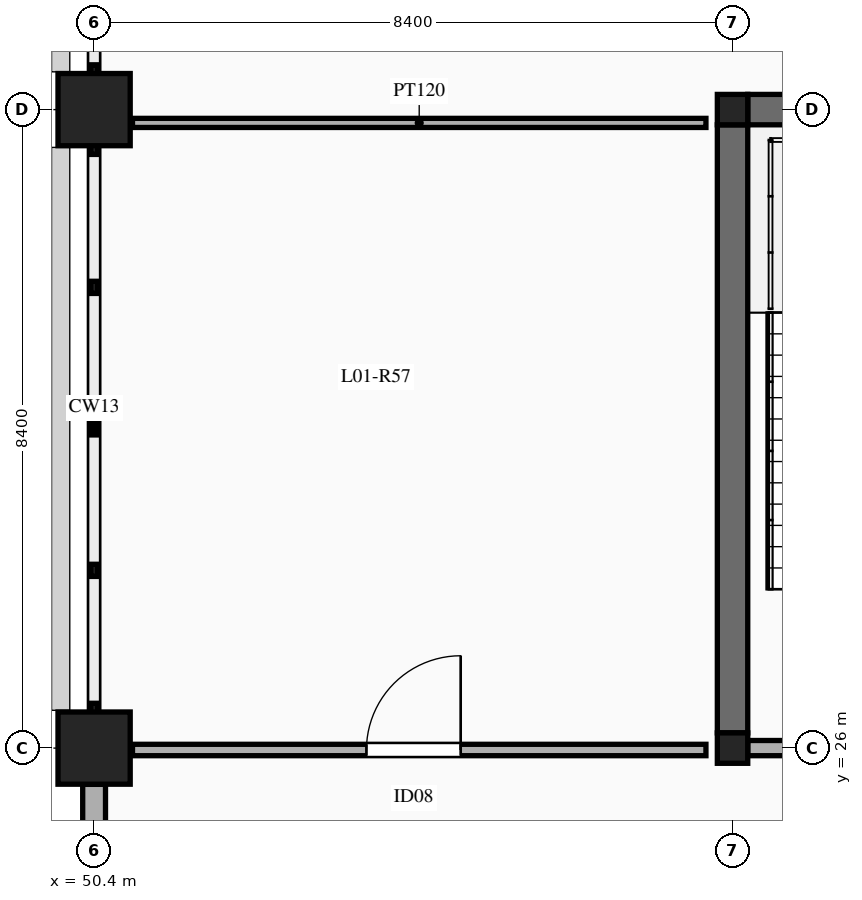
"""IFC4 building model, lengths in metres.
Left out: names, types, materials, properties, quantities, classifications, styles, units other than length and angle.
Written with IfcOpenShell. Run it as: python <this file> out.ifc"""

import sys

from ifc_helpers import new_model, si_unit, direction, frame, frame_2d, origin, origin_2d, place, context, subcontext, project, spatial, rectangle, extrude, element, fill, save


model = new_model("IFC4")
c1 = context("Model", 3, precision=1e-05, world=origin(), true_north=direction((0.0, 1.0)))
c2 = subcontext(c1, "Body", "Model", "MODEL_VIEW")
j1 = project(units=[si_unit("LENGTHUNIT", "METRE"), si_unit("PLANEANGLEUNIT", "RADIAN")], contexts=[c1])
p1 = place(None, origin())
s1 = spatial("IfcSite", under=j1, at=p1, CompositionType="ELEMENT")
p2 = place(p1, origin())
s2 = spatial("IfcBuilding", under=s1, at=p2, CompositionType="ELEMENT")
p3 = place(p2, frame((0.0, 0.0, 5.4)))
s3 = spatial("IfcBuildingStorey", under=s2, at=p3, CompositionType="ELEMENT", Elevation=5.4)
for number, where, z_axis, x_axis in (
    (1, (50.4, 26.0, 0.0), (0.0, 0.0, 1.0), (1.0, 0.0, 0.0)),
    (2, (50.4, 34.4, 0.0), (0.0, 0.0, 1.0), (1.0, 0.0, 0.0)),
):
    element("IfcColumn", number, at=place(p3, frame(where, z_axis=z_axis, x_axis=x_axis)), inside=s3, PredefinedType="COLUMN", context=c2, shape_type="SweptSolid", body=[
        extrude(rectangle(XDim=0.95, YDim=0.95, at=origin_2d()), origin(), (0.0, 0.0, 1.0), 4.8),
    ])
for number, where, z_axis, x_axis in (
    (3, (58.8, 26.0, 0.0), (0.0, 0.0, 1.0), (1.0, 0.0, 0.0)),
    (4, (58.8, 34.4, 0.0), (0.0, 0.0, 1.0), (1.0, 0.0, 0.0)),
):
    element("IfcColumn", number, at=place(p3, frame(where, z_axis=z_axis, x_axis=x_axis)), inside=s3, PredefinedType="COLUMN", context=c2, shape_type="SweptSolid", body=[
        extrude(rectangle(XDim=0.4, YDim=0.4, at=origin_2d()), origin(), (0.0, 0.0, 1.0), 4.8),
    ])
for number, where, z_axis, x_axis in (
    (5, (58.8, 26.2, 0.0), (0.0, 0.0, 1.0), (0.0, 1.0, 0.0)),
    (6, (59.0, 34.4, 0.0), (0.0, 0.0, 1.0), (1.0, 0.0, 0.0)),
):
    element("IfcWall", number, at=place(p3, frame(where, z_axis=z_axis, x_axis=x_axis)), inside=s3, PredefinedType="SHEAR", context=c2, shape_type="SweptSolid", body=[
        extrude(rectangle(XDim=8.0, YDim=0.4, at=frame_2d((4.0, 0.0))), origin(), (0.0, 0.0, 1.0), 4.8),
    ])
p4 = place(p3, frame((50.4, 18.077, 0.0), z_axis=(0.0, 0.0, 1.0), x_axis=(0.0, 1.0, 0.0)))
e7 = element("IfcWall", 7, at=p4, inside=s3, PredefinedType="SOLIDWALL", context=c2, shape_type="SweptSolid", body=[
    extrude(rectangle(XDim=7.446, YDim=0.3, at=frame_2d((3.723, 0.0))), origin(), (0.0, 0.0, 1.0), 3.85),
])
p5 = place(p4, frame((1.062, 0.0, 0.9)))
e8 = element("IfcOpeningElement", 8, at=p5, cuts=e7, PredefinedType="OPENING", context=c2, shape_type="SweptSolid", body=[
    extrude(rectangle(XDim=1.6, YDim=2.1, at=frame_2d((0.8, 1.05))), frame((0.0, 0.16, 0.0), z_axis=(0.0, -1.0, 0.0), x_axis=(1.0, 0.0, 0.0)), (0.0, 0.0, 1.0), 0.32),
])
p6 = place(p4, frame((4.784, 0.0, 0.9)))
e9 = element("IfcOpeningElement", 9, at=p6, cuts=e7, PredefinedType="OPENING", context=c2, shape_type="SweptSolid", body=[
    extrude(rectangle(XDim=1.6, YDim=2.1, at=frame_2d((0.8, 1.05))), frame((0.0, 0.16, 0.0), z_axis=(0.0, -1.0, 0.0), x_axis=(1.0, 0.0, 0.0)), (0.0, 0.0, 1.0), 0.32),
])
p7 = place(p3, frame((59.0, 26.0, 0.0), z_axis=(0.0, 0.0, 1.0), x_axis=(1.0, 0.0, 0.0)))
e10 = element("IfcWall", 10, at=p7, inside=s3, PredefinedType="SOLIDWALL", context=c2, shape_type="SweptSolid", body=[
    extrude(rectangle(XDim=8.0, YDim=0.2, at=frame_2d((4.0, 0.0))), origin(), (0.0, 0.0, 1.0), 3.88),
])
p8 = place(p7, frame((1.55, 0.0, 0.0)))
e11 = element("IfcOpeningElement", 11, at=p8, cuts=e10, PredefinedType="OPENING", context=c2, shape_type="SweptSolid", body=[
    extrude(rectangle(XDim=1.15, YDim=2.15, at=frame_2d((0.575, 1.075))), frame((0.0, 0.11, 0.0), z_axis=(0.0, -1.0, 0.0), x_axis=(1.0, 0.0, 0.0)), (0.0, 0.0, 1.0), 0.22),
])
p9 = place(p7, frame((5.35, 0.0, 0.0)))
e12 = element("IfcOpeningElement", 12, at=p9, cuts=e10, PredefinedType="OPENING", context=c2, shape_type="SweptSolid", body=[
    extrude(rectangle(XDim=1.22, YDim=2.15, at=frame_2d((0.61, 1.075))), frame((0.0, 0.11, 0.0), z_axis=(0.0, -1.0, 0.0), x_axis=(1.0, 0.0, 0.0)), (0.0, 0.0, 1.0), 0.22),
])
p10 = place(p3, frame((50.905, 25.975, 0.0), z_axis=(0.0, 0.0, 1.0), x_axis=(1.0, 0.0, 0.0)))
e13 = element("IfcWall", 13, at=p10, inside=s3, PredefinedType="PARTITIONING", context=c2, shape_type="SweptSolid", body=[
    extrude(rectangle(XDim=7.545, YDim=0.15, at=frame_2d((3.772, 0.0))), origin(), (0.0, 0.0, 1.0), 2.95),
])
p11 = place(p10, frame((3.078, 0.0, 0.0)))
e14 = element("IfcOpeningElement", 14, at=p11, cuts=e13, PredefinedType="OPENING", context=c2, shape_type="SweptSolid", body=[
    extrude(rectangle(XDim=1.24, YDim=2.2, at=frame_2d((0.62, 1.1))), frame((0.0, 0.085, 0.0), z_axis=(0.0, -1.0, 0.0), x_axis=(1.0, 0.0, 0.0)), (0.0, 0.0, 1.0), 0.17),
])
p12 = place(p3, frame((50.905, 34.225, 0.0), z_axis=(0.0, 0.0, 1.0), x_axis=(1.0, 0.0, 0.0)))
e15 = element("IfcWall", 15, at=p12, inside=s3, PredefinedType="PARTITIONING", context=c2, shape_type="SweptSolid", body=[
    extrude(rectangle(XDim=7.545, YDim=0.12, at=frame_2d((3.772, 0.0))), origin(), (0.0, 0.0, 1.0), 2.95),
])
p13 = place(p11, origin())
e16 = element("IfcDoor", 16, at=p13, inside=s3, OperationType="SINGLE_SWING_RIGHT", PredefinedType="DOOR", context=c2, shape_type="SweptSolid", body=[
    extrude(rectangle(XDim=1.24, YDim=2.2, at=frame_2d((0.62, 1.1))), frame((0.0, 0.025, 0.0), z_axis=(0.0, -1.0, 0.0), x_axis=(1.0, 0.0, 0.0)), (0.0, 0.0, 1.0), 0.05),
])
fill(e14, e16)
save(model, sys.argv[1])
